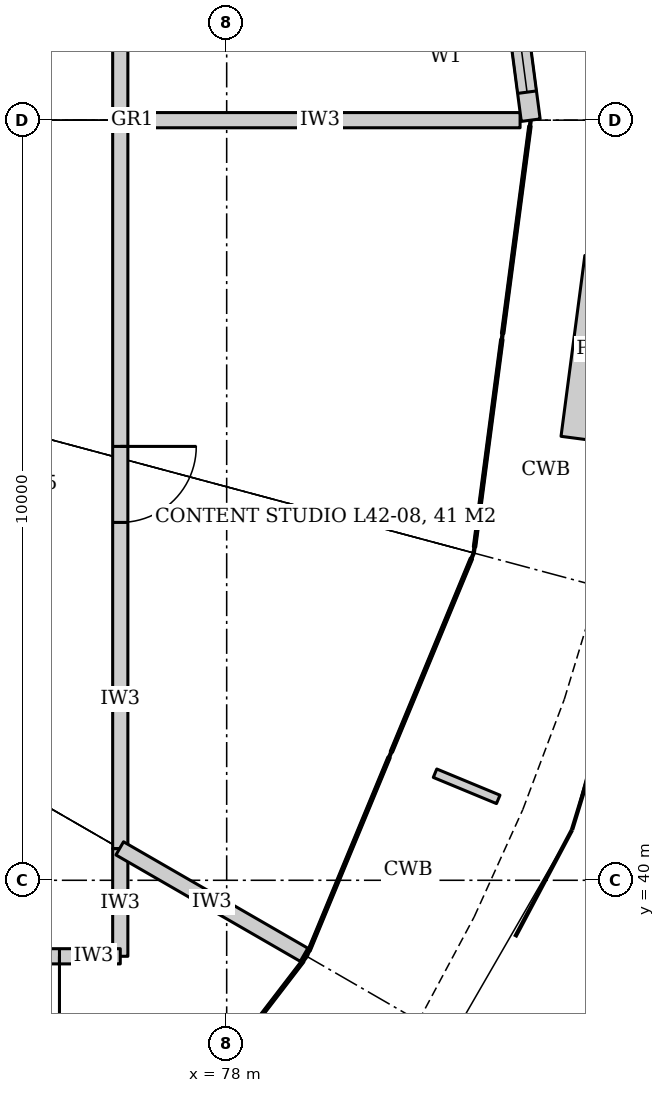
"""IFC4 building model, lengths in metres.
Left out: names, types, materials, properties, quantities, classifications, styles, units other than length and angle.
Written with IfcOpenShell. Run it as: python <this file> out.ifc"""

import sys

from ifc_helpers import new_model, si_unit, direction, frame, frame_2d, origin, place, context, subcontext, project, spatial, rectangle, extrude, element, fill, save


model = new_model("IFC4")
c1 = context("Model", 3, precision=1e-05, world=origin(), true_north=direction((0.0, 1.0)))
c2 = subcontext(c1, "Body", "Model", "MODEL_VIEW")
j1 = project(units=[si_unit("LENGTHUNIT", "METRE"), si_unit("PLANEANGLEUNIT", "RADIAN")], contexts=[c1])
p1 = place(None, origin())
s1 = spatial("IfcSite", under=j1, at=p1, CompositionType="ELEMENT")
p2 = place(p1, origin())
s2 = spatial("IfcBuilding", under=s1, at=p2, CompositionType="ELEMENT")
p3 = place(p2, frame((0.0, 0.0, 185.6)))
s3 = spatial("IfcBuildingStorey", under=s2, at=p3, CompositionType="ELEMENT", Elevation=185.6)
p4 = place(p3, frame((76.6, 59.05, 0.0), z_axis=(0.0, 0.0, 1.0), x_axis=(0.0, -1.0, 0.0)))
e1 = element("IfcWall", 1, at=p4, inside=s3, PredefinedType="PARTITIONING", context=c2, shape_type="SweptSolid", body=[
    extrude(rectangle(XDim=9.05, YDim=0.2, at=frame_2d((4.525, 0.0))), origin(), (0.0, 0.0, 1.0), 3.012),
])
p5 = place(p3, frame((76.6, 50.0, 0.0), z_axis=(0.0, 0.0, 1.0), x_axis=(0.0, -1.0, 0.0)))
e2 = element("IfcWall", 2, at=p5, inside=s3, PredefinedType="PARTITIONING", context=c2, shape_type="SweptSolid", body=[
    extrude(rectangle(XDim=9.584, YDim=0.2, at=frame_2d((4.792, 0.0))), origin(), (0.0, 0.0, 1.0), 3.012),
])
p6 = place(p5, frame((4.292, 0.0, 0.0)))
e3 = element("IfcOpeningElement", 3, at=p6, cuts=e2, PredefinedType="OPENING", context=c2, shape_type="SweptSolid", body=[
    extrude(rectangle(XDim=1.0, YDim=2.1, at=frame_2d((0.5, 1.05))), frame((0.0, 0.11, 0.0), z_axis=(0.0, -1.0, 0.0), x_axis=(1.0, 0.0, 0.0)), (0.0, 0.0, 1.0), 0.22),
])
p7 = place(p3, frame((76.6, 40.416, 0.0), z_axis=(0.0, 0.0, 1.0), x_axis=(0.0, -1.0, 0.0)))
e4 = element("IfcWall", 4, at=p7, inside=s3, PredefinedType="PARTITIONING", context=c2, shape_type="SweptSolid", body=[
    extrude(rectangle(XDim=1.416, YDim=0.2, at=frame_2d((0.708, 0.0))), origin(), (0.0, 0.0, 1.0), 3.012),
])
p8 = place(p3, frame((76.6, 39.0, 0.0), z_axis=(0.0, 0.0, 1.0), x_axis=(-1.0, 0.0, 0.0)))
e5 = element("IfcWall", 5, at=p8, inside=s3, PredefinedType="PARTITIONING", context=c2, shape_type="SweptSolid", body=[
    extrude(rectangle(XDim=3.6, YDim=0.2, at=frame_2d((1.8, 0.0))), origin(), (0.0, 0.0, 1.0), 3.04),
])
p9 = place(p8, frame((0.8, 0.0, 0.0)))
e6 = element("IfcOpeningElement", 6, at=p9, cuts=e5, PredefinedType="OPENING", context=c2, shape_type="SweptSolid", body=[
    extrude(rectangle(XDim=2.0, YDim=2.1, at=frame_2d((1.0, 1.05))), frame((0.0, 0.11, 0.0), z_axis=(0.0, -1.0, 0.0), x_axis=(1.0, 0.0, 0.0)), (0.0, 0.0, 1.0), 0.22),
])
p10 = place(p3, frame((76.6, 50.0, 0.0), z_axis=(0.0, 0.0, 1.0), x_axis=(1.0, 0.0, 0.0)))
e7 = element("IfcWall", 7, at=p10, inside=s3, PredefinedType="PARTITIONING", context=c2, shape_type="SweptSolid", body=[
    extrude(rectangle(XDim=5.26, YDim=0.2, at=frame_2d((2.63, 0.0))), origin(), (0.0, 0.0, 1.0), 3.012),
])
p11 = place(p3, frame((76.593, 40.42, 0.0), z_axis=(0.0, 0.0, 1.0), x_axis=(0.866034573852, -0.49998411664, 0.0)))
e8 = element("IfcWall", 8, at=p11, inside=s3, PredefinedType="PARTITIONING", context=c2, shape_type="SweptSolid", body=[
    extrude(rectangle(XDim=2.8, YDim=0.2, at=frame_2d((1.4, 0.0))), origin(), (0.0, 0.0, 1.0), 3.012),
])
p12 = place(p3, frame((82.0, 50.0, 0.0), z_axis=(0.0, 0.0, 1.0), x_axis=(-0.130503995834, 0.991447783331, 0.0)))
e9 = element("IfcWall", 9, at=p12, inside=s3, PredefinedType="SOLIDWALL", context=c2, shape_type="SweptSolid", body=[
    extrude(rectangle(XDim=5.743, YDim=0.25, at=frame_2d((2.872, 0.0))), origin(), (0.0, 0.0, 1.0), 4.04),
])
p13 = place(p12, frame((1.972, 0.0, 0.0)))
e10 = element("IfcOpeningElement", 10, at=p13, cuts=e9, PredefinedType="OPENING", context=c2, shape_type="SweptSolid", body=[
    extrude(rectangle(XDim=1.8, YDim=2.4, at=frame_2d((0.9, 1.2))), frame((0.0, 0.135, 0.0), z_axis=(0.0, -1.0, 0.0), x_axis=(1.0, 0.0, 0.0)), (0.0, 0.0, 1.0), 0.27),
])
p14 = place(p12, frame((0.372, 0.0, 0.0)))
e11 = element("IfcOpeningElement", 11, at=p14, cuts=e9, PredefinedType="OPENING", context=c2, shape_type="SweptSolid", body=[
    extrude(rectangle(XDim=1.2, YDim=2.4, at=frame_2d((0.6, 1.2))), frame((0.0, 0.135, 0.0), z_axis=(0.0, -1.0, 0.0), x_axis=(1.0, 0.0, 0.0)), (0.0, 0.0, 1.0), 0.27),
])
p15 = place(p12, frame((4.172, 0.0, 0.0)))
e12 = element("IfcOpeningElement", 12, at=p15, cuts=e9, PredefinedType="OPENING", context=c2, shape_type="SweptSolid", body=[
    extrude(rectangle(XDim=1.2, YDim=2.4, at=frame_2d((0.6, 1.2))), frame((0.0, 0.135, 0.0), z_axis=(0.0, -1.0, 0.0), x_axis=(1.0, 0.0, 0.0)), (0.0, 0.0, 1.0), 0.27),
])
p16 = place(p9, origin())
e13 = element("IfcDoor", 13, at=p16, inside=s3, OperationType="DOUBLE_DOOR_DOUBLE_SWING", PredefinedType="DOOR", context=c2, shape_type="SweptSolid", body=[
    extrude(rectangle(XDim=2.0, YDim=2.1, at=frame_2d((1.0, 1.05))), frame((0.0, 0.025, 0.0), z_axis=(0.0, -1.0, 0.0), x_axis=(1.0, 0.0, 0.0)), (0.0, 0.0, 1.0), 0.05),
])
fill(e6, e13)
p17 = place(p6, origin())
e14 = element("IfcDoor", 14, at=p17, inside=s3, OperationType="SINGLE_SWING_LEFT", PredefinedType="DOOR", context=c2, shape_type="SweptSolid", body=[
    extrude(rectangle(XDim=1.0, YDim=2.1, at=frame_2d((0.5, 1.05))), frame((0.0, 0.025, 0.0), z_axis=(0.0, -1.0, 0.0), x_axis=(1.0, 0.0, 0.0)), (0.0, 0.0, 1.0), 0.05),
])
fill(e3, e14)
p18 = place(p14, origin())
e15 = element("IfcWindow", 15, at=p18, inside=s3, PartitioningType="SINGLE_PANEL", PredefinedType="WINDOW", context=c2, shape_type="SweptSolid", body=[
    extrude(rectangle(XDim=1.2, YDim=2.4, at=frame_2d((0.6, 1.2))), frame((0.0, 0.03, 0.0), z_axis=(0.0, -1.0, 0.0), x_axis=(1.0, 0.0, 0.0)), (0.0, 0.0, 1.0), 0.06),
])
fill(e11, e15)
save(model, sys.argv[1])
